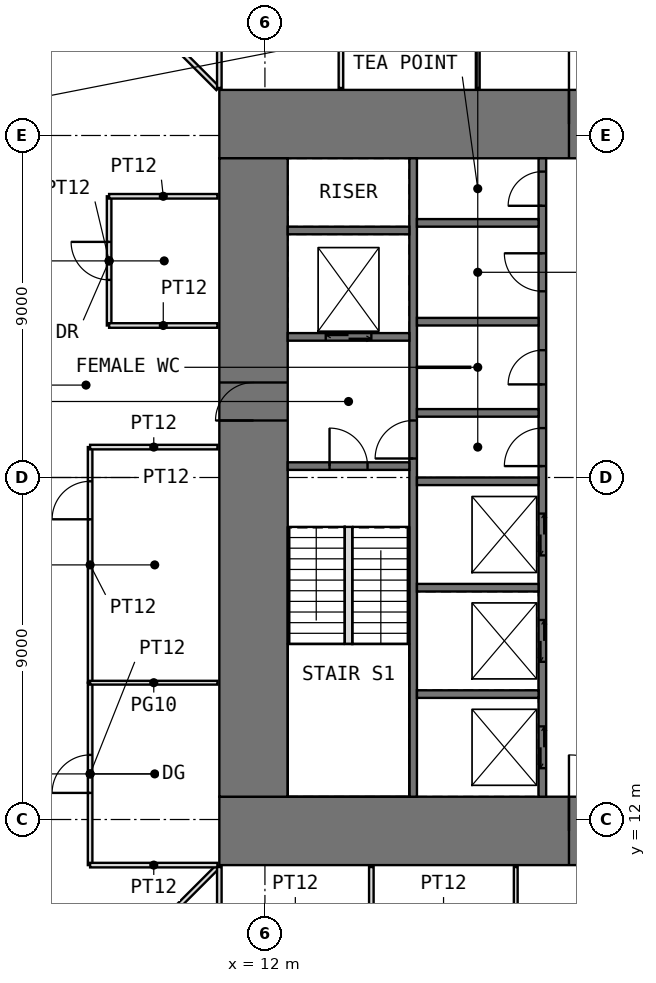
"""IFC4 building model, lengths in metres.
Left out: names, types, materials, properties, quantities, classifications, styles, units other than length and angle.
Written with IfcOpenShell. Run it as: python <this file> out.ifc"""

import sys

from ifc_helpers import new_model, si_unit, direction, frame, frame_2d, origin, place, context, subcontext, project, spatial, rectangle, extrude, element, fill, save


model = new_model("IFC4")
c1 = context("Model", 3, precision=1e-05, world=origin(), true_north=direction((0.0, 1.0)))
c2 = subcontext(c1, "Body", "Model", "MODEL_VIEW")
j1 = project(units=[si_unit("LENGTHUNIT", "METRE"), si_unit("PLANEANGLEUNIT", "RADIAN")], contexts=[c1])
p1 = place(None, origin())
s1 = spatial("IfcSite", under=j1, at=p1, CompositionType="ELEMENT")
p2 = place(p1, origin())
s2 = spatial("IfcBuilding", under=s1, at=p2, CompositionType="ELEMENT")
p3 = place(p2, frame((0.0, 0.0, 42.5)))
s3 = spatial("IfcBuildingStorey", under=s2, at=p3, CompositionType="ELEMENT", Elevation=42.5)
p4 = place(p3, frame((10.8, 11.7, -0.05), z_axis=(0.0, 0.0, 1.0), x_axis=(1.0, 0.0, 0.0)))
e1 = element("IfcWall", 1, at=p4, inside=s3, PredefinedType="SHEAR", context=c2, shape_type="SweptSolid", body=[
    extrude(rectangle(XDim=20.4, YDim=1.8, at=frame_2d((10.2, 0.0))), origin(), (0.0, 0.0, 1.0), 4.0),
])
p5 = place(p4, frame((9.2, 0.0, 0.05)))
e2 = element("IfcOpeningElement", 2, at=p5, cuts=e1, PredefinedType="OPENING", context=c2, shape_type="SweptSolid", body=[
    extrude(rectangle(XDim=2.0, YDim=2.2, at=frame_2d((1.0, 1.1))), frame((0.0, 0.91, 0.0), z_axis=(0.0, -1.0, 0.0), x_axis=(1.0, 0.0, 0.0)), (0.0, 0.0, 1.0), 1.82),
])
p6 = place(p3, frame((10.8, 30.3, -0.05), z_axis=(0.0, 0.0, 1.0), x_axis=(1.0, 0.0, 0.0)))
e3 = element("IfcWall", 3, at=p6, inside=s3, PredefinedType="SHEAR", context=c2, shape_type="SweptSolid", body=[
    extrude(rectangle(XDim=20.4, YDim=1.8, at=frame_2d((10.2, 0.0))), origin(), (0.0, 0.0, 1.0), 4.0),
])
p7 = place(p6, frame((9.2, 0.0, 0.05)))
e4 = element("IfcOpeningElement", 4, at=p7, cuts=e3, PredefinedType="OPENING", context=c2, shape_type="SweptSolid", body=[
    extrude(rectangle(XDim=2.0, YDim=2.2, at=frame_2d((1.0, 1.1))), frame((0.0, 0.91, 0.0), z_axis=(0.0, -1.0, 0.0), x_axis=(1.0, 0.0, 0.0)), (0.0, 0.0, 1.0), 1.82),
])
p8 = place(p3, frame((11.7, 12.6, -0.05), z_axis=(0.0, 0.0, 1.0), x_axis=(0.0, 1.0, 0.0)))
e5 = element("IfcWall", 5, at=p8, inside=s3, PredefinedType="SHEAR", context=c2, shape_type="SweptSolid", body=[
    extrude(rectangle(XDim=16.8, YDim=1.8, at=frame_2d((8.4, 0.0))), origin(), (0.0, 0.0, 1.0), 4.0),
])
p9 = place(p8, frame((9.9, 0.0, 0.05)))
e6 = element("IfcOpeningElement", 6, at=p9, cuts=e5, PredefinedType="OPENING", context=c2, shape_type="SweptSolid", body=[
    extrude(rectangle(XDim=1.0, YDim=2.2, at=frame_2d((0.5, 1.1))), frame((0.0, 0.91, 0.0), z_axis=(0.0, -1.0, 0.0), x_axis=(1.0, 0.0, 0.0)), (0.0, 0.0, 1.0), 1.82),
])
p10 = place(p3, frame((15.9, 12.6, -0.05), z_axis=(0.0, 0.0, 1.0), x_axis=(0.0, 1.0, 0.0)))
e7 = element("IfcWall", 7, at=p10, inside=s3, PredefinedType="SHEAR", context=c2, shape_type="SweptSolid", body=[
    extrude(rectangle(XDim=16.8, YDim=0.2, at=frame_2d((8.4, 0.0))), origin(), (0.0, 0.0, 1.0), 4.0),
])
p11 = place(p10, frame((8.9, 0.0, 0.05)))
e8 = element("IfcOpeningElement", 8, at=p11, cuts=e7, PredefinedType="OPENING", context=c2, shape_type="SweptSolid", body=[
    extrude(rectangle(XDim=1.0, YDim=2.2, at=frame_2d((0.5, 1.1))), frame((0.0, 0.11, 0.0), z_axis=(0.0, -1.0, 0.0), x_axis=(1.0, 0.0, 0.0)), (0.0, 0.0, 1.0), 0.22),
])
p12 = place(p3, frame((19.3, 12.6, -0.05), z_axis=(0.0, 0.0, 1.0), x_axis=(0.0, 1.0, 0.0)))
e9 = element("IfcWall", 9, at=p12, inside=s3, PredefinedType="SHEAR", context=c2, shape_type="SweptSolid", body=[
    extrude(rectangle(XDim=16.8, YDim=0.2, at=frame_2d((8.4, 0.0))), origin(), (0.0, 0.0, 1.0), 4.0),
])
p13 = place(p12, frame((8.7, 0.0, 0.05)))
e10 = element("IfcOpeningElement", 10, at=p13, cuts=e9, PredefinedType="OPENING", context=c2, shape_type="SweptSolid", body=[
    extrude(rectangle(XDim=1.0, YDim=2.2, at=frame_2d((0.5, 1.1))), frame((0.0, 0.11, 0.0), z_axis=(0.0, -1.0, 0.0), x_axis=(1.0, 0.0, 0.0)), (0.0, 0.0, 1.0), 0.22),
])
p14 = place(p12, frame((10.85, 0.0, 0.05)))
e11 = element("IfcOpeningElement", 11, at=p14, cuts=e9, PredefinedType="OPENING", context=c2, shape_type="SweptSolid", body=[
    extrude(rectangle(XDim=0.9, YDim=2.2, at=frame_2d((0.45, 1.1))), frame((0.0, 0.11, 0.0), z_axis=(0.0, -1.0, 0.0), x_axis=(1.0, 0.0, 0.0)), (0.0, 0.0, 1.0), 0.22),
])
p15 = place(p12, frame((13.3, 0.0, 0.05)))
e12 = element("IfcOpeningElement", 12, at=p15, cuts=e9, PredefinedType="OPENING", context=c2, shape_type="SweptSolid", body=[
    extrude(rectangle(XDim=1.0, YDim=2.2, at=frame_2d((0.5, 1.1))), frame((0.0, 0.11, 0.0), z_axis=(0.0, -1.0, 0.0), x_axis=(1.0, 0.0, 0.0)), (0.0, 0.0, 1.0), 0.22),
])
p16 = place(p12, frame((15.55, 0.0, 0.05)))
e13 = element("IfcOpeningElement", 13, at=p16, cuts=e9, PredefinedType="OPENING", context=c2, shape_type="SweptSolid", body=[
    extrude(rectangle(XDim=0.9, YDim=2.2, at=frame_2d((0.45, 1.1))), frame((0.0, 0.11, 0.0), z_axis=(0.0, -1.0, 0.0), x_axis=(1.0, 0.0, 0.0)), (0.0, 0.0, 1.0), 0.22),
])
p17 = place(p12, frame((0.75, 0.0, 0.05)))
e14 = element("IfcOpeningElement", 14, at=p17, cuts=e9, PredefinedType="OPENING", context=c2, shape_type="SweptSolid", body=[
    extrude(rectangle(XDim=1.1, YDim=2.2, at=frame_2d((0.55, 1.1))), frame((0.0, 0.11, 0.0), z_axis=(0.0, -1.0, 0.0), x_axis=(1.0, 0.0, 0.0)), (0.0, 0.0, 1.0), 0.22),
])
p18 = place(p12, frame((3.55, 0.0, 0.05)))
e15 = element("IfcOpeningElement", 15, at=p18, cuts=e9, PredefinedType="OPENING", context=c2, shape_type="SweptSolid", body=[
    extrude(rectangle(XDim=1.1, YDim=2.2, at=frame_2d((0.55, 1.1))), frame((0.0, 0.11, 0.0), z_axis=(0.0, -1.0, 0.0), x_axis=(1.0, 0.0, 0.0)), (0.0, 0.0, 1.0), 0.22),
])
p19 = place(p12, frame((6.35, 0.0, 0.05)))
e16 = element("IfcOpeningElement", 16, at=p19, cuts=e9, PredefinedType="OPENING", context=c2, shape_type="SweptSolid", body=[
    extrude(rectangle(XDim=1.1, YDim=2.2, at=frame_2d((0.55, 1.1))), frame((0.0, 0.11, 0.0), z_axis=(0.0, -1.0, 0.0), x_axis=(1.0, 0.0, 0.0)), (0.0, 0.0, 1.0), 0.22),
])
p20 = place(p3, frame((12.6, 21.3, -0.05), z_axis=(0.0, 0.0, 1.0), x_axis=(1.0, 0.0, 0.0)))
e17 = element("IfcWall", 17, at=p20, inside=s3, PredefinedType="SHEAR", context=c2, shape_type="SweptSolid", body=[
    extrude(rectangle(XDim=3.2, YDim=0.2, at=frame_2d((1.6, 0.0))), origin(), (0.0, 0.0, 1.0), 4.0),
])
p21 = place(p20, frame((1.1, 0.0, 0.05)))
e18 = element("IfcOpeningElement", 18, at=p21, cuts=e17, PredefinedType="OPENING", context=c2, shape_type="SweptSolid", body=[
    extrude(rectangle(XDim=1.0, YDim=2.2, at=frame_2d((0.5, 1.1))), frame((0.0, 0.11, 0.0), z_axis=(0.0, -1.0, 0.0), x_axis=(1.0, 0.0, 0.0)), (0.0, 0.0, 1.0), 0.22),
])
p22 = place(p3, frame((12.6, 24.7, -0.05), z_axis=(0.0, 0.0, 1.0), x_axis=(1.0, 0.0, 0.0)))
e19 = element("IfcWall", 19, at=p22, inside=s3, PredefinedType="SHEAR", context=c2, shape_type="SweptSolid", body=[
    extrude(rectangle(XDim=3.2, YDim=0.2, at=frame_2d((1.6, 0.0))), origin(), (0.0, 0.0, 1.0), 4.0),
])
p23 = place(p22, frame((1.0, 0.0, 0.05)))
e20 = element("IfcOpeningElement", 20, at=p23, cuts=e19, PredefinedType="OPENING", context=c2, shape_type="SweptSolid", body=[
    extrude(rectangle(XDim=1.2, YDim=2.2, at=frame_2d((0.6, 1.1))), frame((0.0, 0.11, 0.0), z_axis=(0.0, -1.0, 0.0), x_axis=(1.0, 0.0, 0.0)), (0.0, 0.0, 1.0), 0.22),
])
for number, where, z_axis, x_axis in (
    (21, (12.6, 27.5, -0.05), (0.0, 0.0, 1.0), (1.0, 0.0, 0.0)),
    (22, (16.0, 15.3, -0.05), (0.0, 0.0, 1.0), (1.0, 0.0, 0.0)),
    (23, (16.0, 18.1, -0.05), (0.0, 0.0, 1.0), (1.0, 0.0, 0.0)),
    (24, (16.0, 20.9, -0.05), (0.0, 0.0, 1.0), (1.0, 0.0, 0.0)),
    (25, (16.0, 22.7, -0.05), (0.0, 0.0, 1.0), (1.0, 0.0, 0.0)),
    (26, (16.0, 25.1, -0.05), (0.0, 0.0, 1.0), (1.0, 0.0, 0.0)),
    (27, (16.0, 27.7, -0.05), (0.0, 0.0, 1.0), (1.0, 0.0, 0.0)),
):
    element("IfcWall", number, at=place(p3, frame(where, z_axis=z_axis, x_axis=x_axis)), inside=s3, PredefinedType="SHEAR", context=c2, shape_type="SweptSolid", body=[
        extrude(rectangle(XDim=3.2, YDim=0.2, at=frame_2d((1.6, 0.0))), origin(), (0.0, 0.0, 1.0), 4.0),
    ])
p24 = place(p3, frame((16.0, 23.9, 0.0), z_axis=(0.0, 0.0, 1.0), x_axis=(1.0, 0.0, 0.0)))
e28 = element("IfcWall", 28, at=p24, inside=s3, PredefinedType="PARTITIONING", context=c2, shape_type="SweptSolid", body=[
    extrude(rectangle(XDim=1.4, YDim=0.03, at=frame_2d((0.7, 0.0))), origin(), (0.0, 0.0, 1.0), 3.75),
])
p25 = place(p3, frame((7.11, 7.11, 0.0), z_axis=(0.0, 0.0, 1.0), x_axis=(0.707106781187, 0.707106781187, 0.0)))
e29 = element("IfcWall", 29, at=p25, inside=s3, PredefinedType="PARTITIONING", context=c2, shape_type="SweptSolid", body=[
    extrude(rectangle(XDim=5.168, YDim=0.12, at=frame_2d((2.584, 0.0))), origin(), (0.0, 0.0, 1.0), 3.75),
])
p26 = place(p3, frame((7.4, 10.8, 0.0), z_axis=(0.0, 0.0, 1.0), x_axis=(0.0, 1.0, 0.0)))
e30 = element("IfcWall", 30, at=p26, inside=s3, PredefinedType="PARTITIONING", context=c2, shape_type="SweptSolid", body=[
    extrude(rectangle(XDim=4.8, YDim=0.12, at=frame_2d((2.4, 0.0))), origin(), (0.0, 0.0, 1.0), 3.75),
])
p27 = place(p26, frame((1.9, 0.0, 0.0)))
e31 = element("IfcOpeningElement", 31, at=p27, cuts=e30, PredefinedType="OPENING", context=c2, shape_type="SweptSolid", body=[
    extrude(rectangle(XDim=1.0, YDim=2.4, at=frame_2d((0.5, 1.2))), frame((0.0, 0.07, 0.0), z_axis=(0.0, -1.0, 0.0), x_axis=(1.0, 0.0, 0.0)), (0.0, 0.0, 1.0), 0.14),
])
p28 = place(p3, frame((7.4, 10.8, 0.0), z_axis=(0.0, 0.0, 1.0), x_axis=(1.0, 0.0, 0.0)))
e32 = element("IfcWall", 32, at=p28, inside=s3, PredefinedType="PARTITIONING", context=c2, shape_type="SweptSolid", body=[
    extrude(rectangle(XDim=3.35, YDim=0.12, at=frame_2d((1.675, 0.0))), origin(), (0.0, 0.0, 1.0), 3.75),
])
p29 = place(p3, frame((7.4, 15.6, 0.0), z_axis=(0.0, 0.0, 1.0), x_axis=(0.0, 1.0, 0.0)))
e33 = element("IfcWall", 33, at=p29, inside=s3, PredefinedType="PARTITIONING", context=c2, shape_type="SweptSolid", body=[
    extrude(rectangle(XDim=6.2, YDim=0.12, at=frame_2d((3.1, 0.0))), origin(), (0.0, 0.0, 1.0), 3.75),
])
p30 = place(p29, frame((4.3, 0.0, 0.0)))
e34 = element("IfcOpeningElement", 34, at=p30, cuts=e33, PredefinedType="OPENING", context=c2, shape_type="SweptSolid", body=[
    extrude(rectangle(XDim=1.0, YDim=2.4, at=frame_2d((0.5, 1.2))), frame((0.0, 0.07, 0.0), z_axis=(0.0, -1.0, 0.0), x_axis=(1.0, 0.0, 0.0)), (0.0, 0.0, 1.0), 0.14),
])
p31 = place(p3, frame((7.4, 15.6, 0.0), z_axis=(0.0, 0.0, 1.0), x_axis=(1.0, 0.0, 0.0)))
e35 = element("IfcWall", 35, at=p31, inside=s3, PredefinedType="PARTITIONING", context=c2, shape_type="SweptSolid", body=[
    extrude(rectangle(XDim=3.35, YDim=0.1, at=frame_2d((1.675, 0.0))), origin(), (0.0, 0.0, 1.0), 3.75),
])
p32 = place(p3, frame((7.4, 21.8, 0.0), z_axis=(0.0, 0.0, 1.0), x_axis=(1.0, 0.0, 0.0)))
e36 = element("IfcWall", 36, at=p32, inside=s3, PredefinedType="PARTITIONING", context=c2, shape_type="SweptSolid", body=[
    extrude(rectangle(XDim=3.35, YDim=0.12, at=frame_2d((1.675, 0.0))), origin(), (0.0, 0.0, 1.0), 3.75),
])
p33 = place(p3, frame((7.9, 25.0, 0.0), z_axis=(0.0, 0.0, 1.0), x_axis=(0.0, 1.0, 0.0)))
e37 = element("IfcWall", 37, at=p33, inside=s3, PredefinedType="PARTITIONING", context=c2, shape_type="SweptSolid", body=[
    extrude(rectangle(XDim=3.4, YDim=0.12, at=frame_2d((1.7, 0.0))), origin(), (0.0, 0.0, 1.0), 3.75),
])
p34 = place(p33, frame((1.2, 0.0, 0.0)))
e38 = element("IfcOpeningElement", 38, at=p34, cuts=e37, PredefinedType="OPENING", context=c2, shape_type="SweptSolid", body=[
    extrude(rectangle(XDim=1.0, YDim=2.2, at=frame_2d((0.5, 1.1))), frame((0.0, 0.07, 0.0), z_axis=(0.0, -1.0, 0.0), x_axis=(1.0, 0.0, 0.0)), (0.0, 0.0, 1.0), 0.14),
])
for number, where, z_axis, x_axis in (
    (39, (7.9, 25.0, 0.0), (0.0, 0.0, 1.0), (1.0, 0.0, 0.0)),
    (40, (7.9, 28.4, 0.0), (0.0, 0.0, 1.0), (1.0, 0.0, 0.0)),
):
    element("IfcWall", number, at=place(p3, frame(where, z_axis=z_axis, x_axis=x_axis)), inside=s3, PredefinedType="PARTITIONING", context=c2, shape_type="SweptSolid", body=[
        extrude(rectangle(XDim=2.85, YDim=0.12, at=frame_2d((1.425, 0.0))), origin(), (0.0, 0.0, 1.0), 3.75),
    ])
p35 = place(p3, frame((8.398, 33.602, 0.0), z_axis=(0.0, 0.0, 1.0), x_axis=(0.707106781187, -0.707106781187, 0.0)))
e41 = element("IfcWall", 41, at=p35, inside=s3, PredefinedType="PARTITIONING", context=c2, shape_type="SweptSolid", body=[
    extrude(rectangle(XDim=3.346, YDim=0.12, at=frame_2d((1.673, 0.0))), origin(), (0.0, 0.0, 1.0), 3.75),
])
p36 = place(p3, frame((10.8, 7.4, 0.0), z_axis=(0.0, 0.0, 1.0), x_axis=(0.0, 1.0, 0.0)))
e42 = element("IfcWall", 42, at=p36, inside=s3, PredefinedType="PARTITIONING", context=c2, shape_type="SweptSolid", body=[
    extrude(rectangle(XDim=3.35, YDim=0.12, at=frame_2d((1.675, 0.0))), origin(), (0.0, 0.0, 1.0), 3.75),
])
for number, where, z_axis, x_axis in (
    (43, (10.8, 31.25, 0.0), (0.0, 0.0, 1.0), (0.0, 1.0, 0.0)),
    (44, (14.0, 31.25, 0.0), (0.0, 0.0, 1.0), (0.0, 1.0, 0.0)),
):
    element("IfcWall", number, at=place(p3, frame(where, z_axis=z_axis, x_axis=x_axis)), inside=s3, PredefinedType="PARTITIONING", context=c2, shape_type="SweptSolid", body=[
        extrude(rectangle(XDim=2.85, YDim=0.12, at=frame_2d((1.425, 0.0))), origin(), (0.0, 0.0, 1.0), 3.75),
    ])
p37 = place(p3, frame((14.8, 7.4, 0.0), z_axis=(0.0, 0.0, 1.0), x_axis=(0.0, 1.0, 0.0)))
e45 = element("IfcWall", 45, at=p37, inside=s3, PredefinedType="PARTITIONING", context=c2, shape_type="SweptSolid", body=[
    extrude(rectangle(XDim=3.35, YDim=0.12, at=frame_2d((1.675, 0.0))), origin(), (0.0, 0.0, 1.0), 3.75),
])
for number, where, z_axis, x_axis in (
    (46, (17.6, 31.25, 0.0), (0.0, 0.0, 1.0), (0.0, 1.0, 0.0)),
    (47, (18.6, 7.4, 0.0), (0.0, 0.0, 1.0), (0.0, 1.0, 0.0)),
):
    element("IfcWall", number, at=place(p3, frame(where, z_axis=z_axis, x_axis=x_axis)), inside=s3, PredefinedType="PARTITIONING", context=c2, shape_type="SweptSolid", body=[
        extrude(rectangle(XDim=3.35, YDim=0.1, at=frame_2d((1.675, 0.0))), origin(), (0.0, 0.0, 1.0), 3.75),
    ])
p38 = place(p3, frame((14.2, 16.62, 0.0), z_axis=(0.0, 0.0, 1.0), x_axis=(0.0, 1.0, 0.0)))
e48 = element("IfcWall", 48, at=p38, inside=s3, PredefinedType="PARTITIONING", context=c2, shape_type="SweptSolid", body=[
    extrude(rectangle(XDim=3.08, YDim=0.2, at=frame_2d((1.54, 0.0))), origin(), (0.0, 0.0, 1.0), 4.0),
])
p39 = place(p5, origin())
e49 = element("IfcDoor", 49, at=p39, inside=s3, OperationType="DOUBLE_DOOR_SINGLE_SWING", PredefinedType="DOOR", context=c2, shape_type="SweptSolid", body=[
    extrude(rectangle(XDim=2.0, YDim=2.2, at=frame_2d((1.0, 1.1))), frame((0.0, 0.025, 0.0), z_axis=(0.0, -1.0, 0.0), x_axis=(1.0, 0.0, 0.0)), (0.0, 0.0, 1.0), 0.05),
])
fill(e2, e49)
p40 = place(p7, origin())
e50 = element("IfcDoor", 50, at=p40, inside=s3, OperationType="DOUBLE_DOOR_SINGLE_SWING", PredefinedType="DOOR", context=c2, shape_type="SweptSolid", body=[
    extrude(rectangle(XDim=2.0, YDim=2.2, at=frame_2d((1.0, 1.1))), frame((0.0, 0.025, 0.0), z_axis=(0.0, -1.0, 0.0), x_axis=(1.0, 0.0, 0.0)), (0.0, 0.0, 1.0), 0.05),
])
fill(e4, e50)
p41 = place(p9, origin())
e51 = element("IfcDoor", 51, at=p41, inside=s3, OperationType="SINGLE_SWING_LEFT", PredefinedType="DOOR", context=c2, shape_type="SweptSolid", body=[
    extrude(rectangle(XDim=1.0, YDim=2.2, at=frame_2d((0.5, 1.1))), frame((0.0, 0.025, 0.0), z_axis=(0.0, -1.0, 0.0), x_axis=(1.0, 0.0, 0.0)), (0.0, 0.0, 1.0), 0.05),
])
fill(e6, e51)
p42 = place(p21, origin())
e52 = element("IfcDoor", 52, at=p42, inside=s3, OperationType="SINGLE_SWING_LEFT", PredefinedType="DOOR", context=c2, shape_type="SweptSolid", body=[
    extrude(rectangle(XDim=1.0, YDim=2.2, at=frame_2d((0.5, 1.1))), frame((0.0, 0.025, 0.0), z_axis=(0.0, -1.0, 0.0), x_axis=(1.0, 0.0, 0.0)), (0.0, 0.0, 1.0), 0.05),
])
fill(e18, e52)
p43 = place(p11, origin())
e53 = element("IfcDoor", 53, at=p43, inside=s3, OperationType="SINGLE_SWING_LEFT", PredefinedType="DOOR", context=c2, shape_type="SweptSolid", body=[
    extrude(rectangle(XDim=1.0, YDim=2.2, at=frame_2d((0.5, 1.1))), frame((0.0, 0.025, 0.0), z_axis=(0.0, -1.0, 0.0), x_axis=(1.0, 0.0, 0.0)), (0.0, 0.0, 1.0), 0.05),
])
fill(e8, e53)
p44 = place(p13, origin())
e54 = element("IfcDoor", 54, at=p44, inside=s3, OperationType="SINGLE_SWING_LEFT", PredefinedType="DOOR", context=c2, shape_type="SweptSolid", body=[
    extrude(rectangle(XDim=1.0, YDim=2.2, at=frame_2d((0.5, 1.1))), frame((0.0, 0.025, 0.0), z_axis=(0.0, -1.0, 0.0), x_axis=(1.0, 0.0, 0.0)), (0.0, 0.0, 1.0), 0.05),
])
fill(e10, e54)
p45 = place(p14, origin())
e55 = element("IfcDoor", 55, at=p45, inside=s3, OperationType="SINGLE_SWING_LEFT", PredefinedType="DOOR", context=c2, shape_type="SweptSolid", body=[
    extrude(rectangle(XDim=0.9, YDim=2.2, at=frame_2d((0.45, 1.1))), frame((0.0, 0.025, 0.0), z_axis=(0.0, -1.0, 0.0), x_axis=(1.0, 0.0, 0.0)), (0.0, 0.0, 1.0), 0.05),
])
fill(e11, e55)
p46 = place(p15, origin())
e56 = element("IfcDoor", 56, at=p46, inside=s3, OperationType="SINGLE_SWING_RIGHT", PredefinedType="DOOR", context=c2, shape_type="SweptSolid", body=[
    extrude(rectangle(XDim=1.0, YDim=2.2, at=frame_2d((0.5, 1.1))), frame((0.0, 0.025, 0.0), z_axis=(0.0, -1.0, 0.0), x_axis=(1.0, 0.0, 0.0)), (0.0, 0.0, 1.0), 0.05),
])
fill(e12, e56)
p47 = place(p16, origin())
e57 = element("IfcDoor", 57, at=p47, inside=s3, OperationType="SINGLE_SWING_LEFT", PredefinedType="DOOR", context=c2, shape_type="SweptSolid", body=[
    extrude(rectangle(XDim=0.9, YDim=2.2, at=frame_2d((0.45, 1.1))), frame((0.0, 0.025, 0.0), z_axis=(0.0, -1.0, 0.0), x_axis=(1.0, 0.0, 0.0)), (0.0, 0.0, 1.0), 0.05),
])
fill(e13, e57)
p48 = place(p27, origin())
e58 = element("IfcDoor", 58, at=p48, inside=s3, OperationType="SINGLE_SWING_LEFT", PredefinedType="DOOR", context=c2, shape_type="SweptSolid", body=[
    extrude(rectangle(XDim=1.0, YDim=2.4, at=frame_2d((0.5, 1.2))), frame((0.0, 0.025, 0.0), z_axis=(0.0, -1.0, 0.0), x_axis=(1.0, 0.0, 0.0)), (0.0, 0.0, 1.0), 0.05),
])
fill(e31, e58)
p49 = place(p34, origin())
e59 = element("IfcDoor", 59, at=p49, inside=s3, OperationType="SINGLE_SWING_RIGHT", PredefinedType="DOOR", context=c2, shape_type="SweptSolid", body=[
    extrude(rectangle(XDim=1.0, YDim=2.2, at=frame_2d((0.5, 1.1))), frame((0.0, 0.025, 0.0), z_axis=(0.0, -1.0, 0.0), x_axis=(1.0, 0.0, 0.0)), (0.0, 0.0, 1.0), 0.05),
])
fill(e38, e59)
p50 = place(p30, origin())
e60 = element("IfcDoor", 60, at=p50, inside=s3, OperationType="SINGLE_SWING_LEFT", PredefinedType="DOOR", context=c2, shape_type="SweptSolid", body=[
    extrude(rectangle(XDim=1.0, YDim=2.4, at=frame_2d((0.5, 1.2))), frame((0.0, 0.025, 0.0), z_axis=(0.0, -1.0, 0.0), x_axis=(1.0, 0.0, 0.0)), (0.0, 0.0, 1.0), 0.05),
])
fill(e34, e60)
p51 = place(p17, origin())
e61 = element("IfcDoor", 61, at=p51, inside=s3, OperationType="DOUBLE_DOOR_SLIDING", PredefinedType="DOOR", context=c2, shape_type="SweptSolid", body=[
    extrude(rectangle(XDim=1.1, YDim=2.2, at=frame_2d((0.55, 1.1))), frame((0.0, 0.025, 0.0), z_axis=(0.0, -1.0, 0.0), x_axis=(1.0, 0.0, 0.0)), (0.0, 0.0, 1.0), 0.05),
])
fill(e14, e61)
p52 = place(p18, origin())
e62 = element("IfcDoor", 62, at=p52, inside=s3, OperationType="DOUBLE_DOOR_SLIDING", PredefinedType="DOOR", context=c2, shape_type="SweptSolid", body=[
    extrude(rectangle(XDim=1.1, YDim=2.2, at=frame_2d((0.55, 1.1))), frame((0.0, 0.025, 0.0), z_axis=(0.0, -1.0, 0.0), x_axis=(1.0, 0.0, 0.0)), (0.0, 0.0, 1.0), 0.05),
])
fill(e15, e62)
p53 = place(p19, origin())
e63 = element("IfcDoor", 63, at=p53, inside=s3, OperationType="DOUBLE_DOOR_SLIDING", PredefinedType="DOOR", context=c2, shape_type="SweptSolid", body=[
    extrude(rectangle(XDim=1.1, YDim=2.2, at=frame_2d((0.55, 1.1))), frame((0.0, 0.025, 0.0), z_axis=(0.0, -1.0, 0.0), x_axis=(1.0, 0.0, 0.0)), (0.0, 0.0, 1.0), 0.05),
])
fill(e16, e63)
p54 = place(p23, origin())
e64 = element("IfcDoor", 64, at=p54, inside=s3, OperationType="DOUBLE_DOOR_SLIDING", PredefinedType="DOOR", context=c2, shape_type="SweptSolid", body=[
    extrude(rectangle(XDim=1.2, YDim=2.2, at=frame_2d((0.6, 1.1))), frame((0.0, 0.025, 0.0), z_axis=(0.0, -1.0, 0.0), x_axis=(1.0, 0.0, 0.0)), (0.0, 0.0, 1.0), 0.05),
])
fill(e20, e64)
save(model, sys.argv[1])
